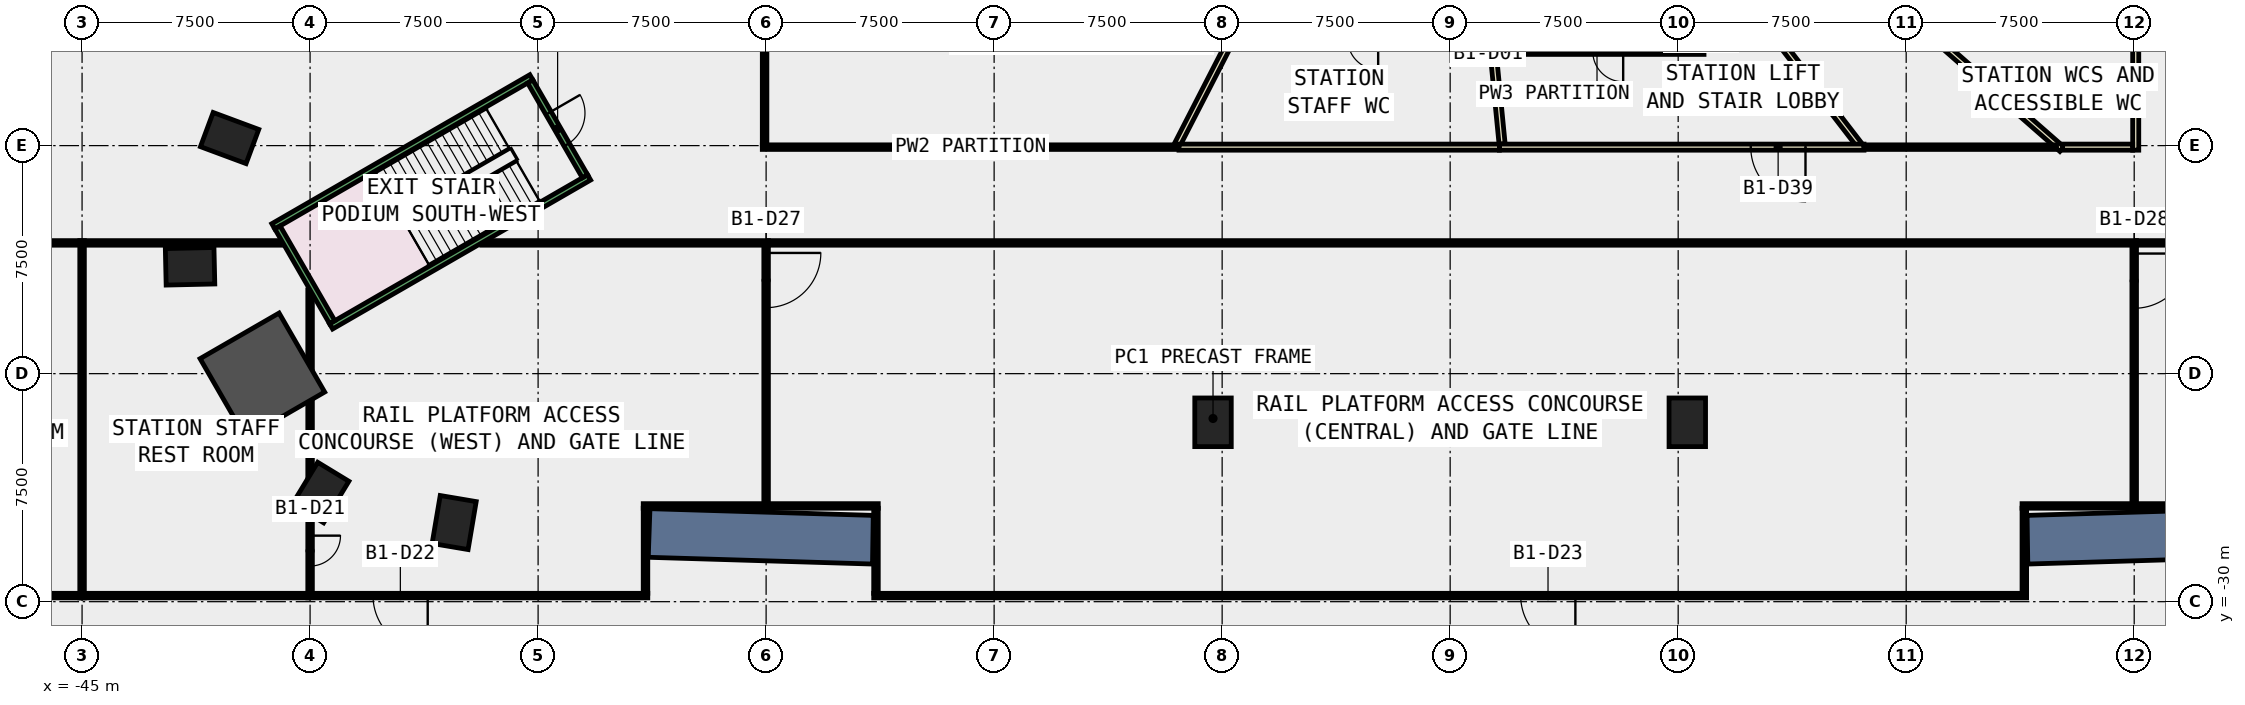
"""IFC4 building model, lengths in metres.
Left out: names, types, materials, properties, quantities, classifications, styles, units other than length and angle.
Written with IfcOpenShell. Run it as: python <this file> out.ifc"""

import sys

from ifc_helpers import new_model, si_unit, direction, frame, frame_2d, origin, origin_2d, place, context, subcontext, project, spatial, polyline, rectangle, outline, extrude, element, fill, save


model = new_model("IFC4")
c1 = context("Model", 3, precision=1e-05, world=origin(), true_north=direction((0.0, 1.0)))
c2 = subcontext(c1, "Body", "Model", "MODEL_VIEW")
j1 = project(units=[si_unit("LENGTHUNIT", "METRE"), si_unit("PLANEANGLEUNIT", "RADIAN")], contexts=[c1])
p1 = place(None, origin())
s1 = spatial("IfcSite", under=j1, at=p1, CompositionType="ELEMENT")
p2 = place(p1, origin())
s2 = spatial("IfcBuilding", under=s1, at=p2, CompositionType="ELEMENT")
p3 = place(p2, frame((0.0, 0.0, -5.5)))
s3 = spatial("IfcBuildingStorey", under=s2, at=p3, CompositionType="ELEMENT", Elevation=-5.5)
for number, where, z_axis, x_axis in (
    (1, (-32.761, -27.397, -0.42), (0.0, 0.0, 1.0), (-0.986, 0.167, 0.0)),
    (2, (-40.147, -14.751, -0.42), (0.0, 0.0, 1.0), (0.348, 0.937, 0.0)),
    (3, (-41.448, -18.969, -0.42), (0.0, 0.0, 1.0), (-0.023, 1.0, 0.0)),
):
    element("IfcColumn", number, at=place(p3, frame(where, z_axis=z_axis, x_axis=x_axis)), inside=s3, PredefinedType="COLUMN", context=c2, shape_type="SweptSolid", body=[
        extrude(rectangle(XDim=1.2, YDim=1.6, at=origin_2d()), origin(), (0.0, 0.0, 1.0), 5.42),
    ])
p4 = place(p3, frame((-39.069, -22.556, -0.42), z_axis=(0.0, 0.0, 1.0), x_axis=(0.866025403784, 0.5, 0.0)))
e4 = element("IfcColumn", 4, at=p4, inside=s3, PredefinedType="COLUMN", context=c2, shape_type="SweptSolid", body=[
    extrude(rectangle(XDim=3.0, YDim=3.0, at=origin_2d()), origin(), (0.0, 0.0, 1.0), 5.42),
])
for number, where, z_axis, x_axis in (
    (5, (-37.152, -26.411, -0.42), (0.0, 0.0, 1.0), (-0.855, 0.519, 0.0)),
    (6, (-7.8, -24.1, -0.42), (0.0, 0.0, 1.0), (1.0, 0.0, 0.0)),
    (7, (7.8, -24.1, -0.42), (0.0, 0.0, 1.0), (1.0, 0.0, 0.0)),
):
    element("IfcColumn", number, at=place(p3, frame(where, z_axis=z_axis, x_axis=x_axis)), inside=s3, PredefinedType="COLUMN", context=c2, shape_type="SweptSolid", body=[
        extrude(rectangle(XDim=1.2, YDim=1.6, at=origin_2d()), origin(), (0.0, 0.0, 1.0), 5.42),
    ])
p5 = place(p3, frame((0.0, 0.0, -0.42)))
e8 = element("IfcWall", 8, at=p5, inside=s3, PredefinedType="SHEAR", context=c2, shape_type="SweptSolid", body=[
    extrude(outline(polyline([(19.0, -28.762), (26.377, -28.54), (26.321, -26.941), (18.976, -27.162), (19.0, -28.762)])), origin(), (0.0, 0.0, 1.0), 5.42),
])
p6 = place(p3, frame((0.0, 0.0, -0.42)))
e9 = element("IfcWall", 9, at=p6, inside=s3, PredefinedType="SHEAR", context=c2, shape_type="SweptSolid", body=[
    extrude(outline(polyline([(-26.377, -28.54), (-19.0, -28.762), (-18.976, -27.162), (-26.321, -26.941), (-26.377, -28.54)])), origin(), (0.0, 0.0, 1.0), 5.42),
])
p7 = place(p3, frame((8.35, -11.9, 0.0), z_axis=(0.0, 0.0, 1.0), x_axis=(-1.0, 0.0, 0.0)))
e10 = element("IfcWall", 10, at=p7, inside=s3, PredefinedType="PARTITIONING", context=c2, shape_type="SweptSolid", body=[
    extrude(rectangle(XDim=7.039, YDim=0.2, at=frame_2d((3.52, 0.0))), origin(), (0.0, 0.0, 1.0), 4.9),
])
p8 = place(p7, frame((2.659, 0.0, 0.0)))
e11 = element("IfcOpeningElement", 11, at=p8, cuts=e10, PredefinedType="OPENING", context=c2, shape_type="SweptSolid", body=[
    extrude(rectangle(XDim=1.0, YDim=2.1, at=frame_2d((0.5, 1.05))), frame((0.0, 0.11, 0.0), z_axis=(0.0, -1.0, 0.0), x_axis=(1.0, 0.0, 0.0)), (0.0, 0.0, 1.0), 0.22),
])
p9 = place(p3, frame((1.25, -12.0, 0.0), z_axis=(0.0, 0.0, 1.0), x_axis=(0.0, 1.0, 0.0)))
e12 = element("IfcWall", 12, at=p9, inside=s3, PredefinedType="PARTITIONING", context=c2, shape_type="SweptSolid", body=[
    extrude(rectangle(XDim=0.4, YDim=0.2, at=frame_2d((0.2, 0.0))), origin(), (0.0, 0.0, 1.0), 4.9),
])
p10 = place(p3, frame((1.709, -14.95, 0.0), z_axis=(0.0, 0.0, 1.0), x_axis=(-0.097271264249, 0.995257906852, 0.0)))
e13 = element("IfcWall", 13, at=p10, inside=s3, PredefinedType="PARTITIONING", context=c2, shape_type="SweptSolid", body=[
    extrude(rectangle(XDim=3.065, YDim=0.2, at=frame_2d((1.532, 0.0))), origin(), (0.0, 0.0, 1.0), 4.9),
])
p11 = place(p3, frame((9.177, -9.419, 0.0), z_axis=(0.0, 0.0, 1.0), x_axis=(0.610138829962, -0.792294521104, 0.0)))
e14 = element("IfcWall", 14, at=p11, inside=s3, PredefinedType="PARTITIONING", context=c2, shape_type="SweptSolid", body=[
    extrude(rectangle(XDim=7.082, YDim=0.2, at=frame_2d((3.541, 0.0))), origin(), (0.0, 0.0, 1.0), 4.9),
])
p12 = place(p3, frame((13.613, -15.05, 0.0), z_axis=(0.0, 0.0, 1.0), x_axis=(-1.0, 0.0, 0.0)))
e15 = element("IfcWall", 15, at=p12, inside=s3, PredefinedType="PARTITIONING", context=c2, shape_type="SweptSolid", body=[
    extrude(rectangle(XDim=11.994, YDim=0.2, at=frame_2d((5.997, 0.0))), origin(), (0.0, 0.0, 1.0), 4.9),
])
p13 = place(p12, frame((1.925, 0.0, 0.0)))
e16 = element("IfcOpeningElement", 16, at=p13, cuts=e15, PredefinedType="OPENING", context=c2, shape_type="SweptSolid", body=[
    extrude(rectangle(XDim=1.8, YDim=2.1, at=frame_2d((0.9, 1.05))), frame((0.0, 0.11, 0.0), z_axis=(0.0, -1.0, 0.0), x_axis=(1.0, 0.0, 0.0)), (0.0, 0.0, 1.0), 0.22),
])
p14 = place(p3, frame((-7.196, -11.5, 0.0), z_axis=(0.0, 0.0, 1.0), x_axis=(-0.456975104855, -0.889479484611, 0.0)))
e17 = element("IfcWall", 17, at=p14, inside=s3, PredefinedType="PARTITIONING", context=c2, shape_type="SweptSolid", body=[
    extrude(rectangle(XDim=3.891, YDim=0.2, at=frame_2d((1.945, 0.0))), origin(), (0.0, 0.0, 1.0), 4.9),
])
p15 = place(p3, frame((-8.92, -15.05, 0.0), z_axis=(0.0, 0.0, 1.0), x_axis=(-1.0, 0.0, 0.0)))
e18 = element("IfcWall", 18, at=p15, inside=s3, PredefinedType="PARTITIONING", context=c2, shape_type="SweptSolid", body=[
    extrude(rectangle(XDim=13.705, YDim=0.15, at=frame_2d((6.853, 0.0))), origin(), (0.0, 0.0, 1.0), 4.9),
])
p16 = place(p3, frame((-22.55, -14.975, 0.0), z_axis=(0.0, 0.0, 1.0), x_axis=(0.0, 1.0, 0.0)))
e19 = element("IfcWall", 19, at=p16, inside=s3, PredefinedType="PARTITIONING", context=c2, shape_type="SweptSolid", body=[
    extrude(rectangle(XDim=4.381, YDim=0.15, at=frame_2d((2.19, 0.0))), origin(), (0.0, 0.0, 1.0), 4.9),
])
p17 = place(p3, frame((1.619, -15.05, 0.0), z_axis=(0.0, 0.0, 1.0), x_axis=(-1.0, 0.0, 0.0)))
e20 = element("IfcWall", 20, at=p17, inside=s3, PredefinedType="PARTITIONING", context=c2, shape_type="SweptSolid", body=[
    extrude(rectangle(XDim=10.539, YDim=0.2, at=frame_2d((5.27, 0.0))), origin(), (0.0, 0.0, 1.0), 4.9),
])
p18 = place(p3, frame((10.663, -6.835, 0.0), z_axis=(0.0, 0.0, 1.0), x_axis=(0.752369729321, -0.658741064761, 0.0)))
e21 = element("IfcWall", 21, at=p18, inside=s3, PredefinedType="PARTITIONING", context=c2, shape_type="SweptSolid", body=[
    extrude(rectangle(XDim=12.571, YDim=0.2, at=frame_2d((6.286, 0.0))), origin(), (0.0, 0.0, 1.0), 4.9),
])
p19 = place(p3, frame((19.946, -15.05, 0.0), z_axis=(0.0, 0.0, 1.0), x_axis=(-1.0, 0.0, 0.0)))
e22 = element("IfcWall", 22, at=p19, inside=s3, PredefinedType="PARTITIONING", context=c2, shape_type="SweptSolid", body=[
    extrude(rectangle(XDim=6.333, YDim=0.15, at=frame_2d((3.167, 0.0))), origin(), (0.0, 0.0, 1.0), 4.9),
])
p20 = place(p3, frame((22.55, -10.619, 0.0), z_axis=(0.0, 0.0, 1.0), x_axis=(0.0, -1.0, 0.0)))
e23 = element("IfcWall", 23, at=p20, inside=s3, PredefinedType="PARTITIONING", context=c2, shape_type="SweptSolid", body=[
    extrude(rectangle(XDim=4.531, YDim=0.2, at=frame_2d((2.266, 0.0))), origin(), (0.0, 0.0, 1.0), 4.9),
])
p21 = place(p3, frame((22.45, -15.05, 0.0), z_axis=(0.0, 0.0, 1.0), x_axis=(-1.0, 0.0, 0.0)))
e24 = element("IfcWall", 24, at=p21, inside=s3, PredefinedType="PARTITIONING", context=c2, shape_type="SweptSolid", body=[
    extrude(rectangle(XDim=2.304, YDim=0.2, at=frame_2d((1.152, 0.0))), origin(), (0.0, 0.0, 1.0), 4.9),
])
for number, where, z_axis, x_axis in (
    (25, (-52.425, -18.2, 0.0), (0.0, 0.0, 1.0), (1.0, 0.0, 0.0)),
    (26, (-45.075, -29.8, 0.0), (0.0, 0.0, 1.0), (-1.0, 0.0, 0.0)),
):
    element("IfcWall", number, at=place(p3, frame(where, z_axis=z_axis, x_axis=x_axis)), inside=s3, PredefinedType="PARTITIONING", context=c2, shape_type="SweptSolid", body=[
        extrude(rectangle(XDim=7.35, YDim=0.15, at=frame_2d((3.675, 0.0))), origin(), (0.0, 0.0, 1.0), 4.9),
    ])
p22 = place(p3, frame((-44.925, -18.2, 0.0), z_axis=(0.0, 0.0, 1.0), x_axis=(1.0, 0.0, 0.0)))
e27 = element("IfcWall", 27, at=p22, inside=s3, PredefinedType="PARTITIONING", context=c2, shape_type="SweptSolid", body=[
    extrude(rectangle(XDim=6.531, YDim=0.15, at=frame_2d((3.266, 0.0))), origin(), (0.0, 0.0, 1.0), 4.9),
])
p23 = place(p3, frame((-37.575, -29.8, 0.0), z_axis=(0.0, 0.0, 1.0), x_axis=(-1.0, 0.0, 0.0)))
e28 = element("IfcWall", 28, at=p23, inside=s3, PredefinedType="PARTITIONING", context=c2, shape_type="SweptSolid", body=[
    extrude(rectangle(XDim=7.35, YDim=0.15, at=frame_2d((3.675, 0.0))), origin(), (0.0, 0.0, 1.0), 4.9),
])
p24 = place(p3, frame((-31.853, -18.2, 0.0), z_axis=(0.0, 0.0, 1.0), x_axis=(1.0, 0.0, 0.0)))
e29 = element("IfcWall", 29, at=p24, inside=s3, PredefinedType="PARTITIONING", context=c2, shape_type="SweptSolid", body=[
    extrude(rectangle(XDim=9.428, YDim=0.15, at=frame_2d((4.714, 0.0))), origin(), (0.0, 0.0, 1.0), 4.9),
])
p25 = place(p3, frame((-22.575, -26.851, 0.0), z_axis=(0.0, 0.0, 1.0), x_axis=(-1.0, 0.0, 0.0)))
e30 = element("IfcWall", 30, at=p25, inside=s3, PredefinedType="PARTITIONING", context=c2, shape_type="SweptSolid", body=[
    extrude(rectangle(XDim=3.967, YDim=0.15, at=frame_2d((1.983, 0.0))), origin(), (0.0, 0.0, 1.0), 4.9),
])
p26 = place(p3, frame((-26.467, -26.926, 0.0), z_axis=(0.0, 0.0, 1.0), x_axis=(0.0, -1.0, 0.0)))
e31 = element("IfcWall", 31, at=p26, inside=s3, PredefinedType="PARTITIONING", context=c2, shape_type="SweptSolid", body=[
    extrude(rectangle(XDim=2.799, YDim=0.15, at=frame_2d((1.399, 0.0))), origin(), (0.0, 0.0, 1.0), 4.9),
])
p27 = place(p3, frame((-26.392, -29.8, 0.0), z_axis=(0.0, 0.0, 1.0), x_axis=(-1.0, 0.0, 0.0)))
e32 = element("IfcWall", 32, at=p27, inside=s3, PredefinedType="PARTITIONING", context=c2, shape_type="SweptSolid", body=[
    extrude(rectangle(XDim=11.183, YDim=0.15, at=frame_2d((5.591, 0.0))), origin(), (0.0, 0.0, 1.0), 4.9),
])
p28 = place(p27, frame((7.239, 0.0, 0.0)))
e33 = element("IfcOpeningElement", 33, at=p28, cuts=e32, PredefinedType="OPENING", context=c2, shape_type="SweptSolid", body=[
    extrude(rectangle(XDim=1.8, YDim=2.1, at=frame_2d((0.9, 1.05))), frame((0.0, 0.085, 0.0), z_axis=(0.0, -1.0, 0.0), x_axis=(1.0, 0.0, 0.0)), (0.0, 0.0, 1.0), 0.17),
])
p29 = place(p3, frame((22.425, -26.851, 0.0), z_axis=(0.0, 0.0, 1.0), x_axis=(-1.0, 0.0, 0.0)))
e34 = element("IfcWall", 34, at=p29, inside=s3, PredefinedType="PARTITIONING", context=c2, shape_type="SweptSolid", body=[
    extrude(rectangle(XDim=3.614, YDim=0.15, at=frame_2d((1.807, 0.0))), origin(), (0.0, 0.0, 1.0), 4.9),
])
p30 = place(p3, frame((18.886, -26.926, 0.0), z_axis=(0.0, 0.0, 1.0), x_axis=(0.0, -1.0, 0.0)))
e35 = element("IfcWall", 35, at=p30, inside=s3, PredefinedType="PARTITIONING", context=c2, shape_type="SweptSolid", body=[
    extrude(rectangle(XDim=2.799, YDim=0.15, at=frame_2d((1.399, 0.0))), origin(), (0.0, 0.0, 1.0), 4.9),
])
p31 = place(p3, frame((18.961, -29.8, 0.0), z_axis=(0.0, 0.0, 1.0), x_axis=(-1.0, 0.0, 0.0)))
e36 = element("IfcWall", 36, at=p31, inside=s3, PredefinedType="PARTITIONING", context=c2, shape_type="SweptSolid", body=[
    extrude(rectangle(XDim=37.922, YDim=0.15, at=frame_2d((18.961, 0.0))), origin(), (0.0, 0.0, 1.0), 4.9),
])
p32 = place(p31, frame((14.842, 0.0, 0.0)))
e37 = element("IfcOpeningElement", 37, at=p32, cuts=e36, PredefinedType="OPENING", context=c2, shape_type="SweptSolid", body=[
    extrude(rectangle(XDim=1.8, YDim=2.1, at=frame_2d((0.9, 1.05))), frame((0.0, 0.085, 0.0), z_axis=(0.0, -1.0, 0.0), x_axis=(1.0, 0.0, 0.0)), (0.0, 0.0, 1.0), 0.17),
])
p33 = place(p3, frame((-18.886, -29.725, 0.0), z_axis=(0.0, 0.0, 1.0), x_axis=(0.0, 1.0, 0.0)))
e38 = element("IfcWall", 38, at=p33, inside=s3, PredefinedType="PARTITIONING", context=c2, shape_type="SweptSolid", body=[
    extrude(rectangle(XDim=2.799, YDim=0.15, at=frame_2d((1.399, 0.0))), origin(), (0.0, 0.0, 1.0), 4.9),
])
p34 = place(p3, frame((-18.811, -26.851, 0.0), z_axis=(0.0, 0.0, 1.0), x_axis=(-1.0, 0.0, 0.0)))
e39 = element("IfcWall", 39, at=p34, inside=s3, PredefinedType="PARTITIONING", context=c2, shape_type="SweptSolid", body=[
    extrude(rectangle(XDim=3.614, YDim=0.15, at=frame_2d((1.807, 0.0))), origin(), (0.0, 0.0, 1.0), 4.9),
])
p35 = place(p3, frame((-22.425, -18.2, 0.0), z_axis=(0.0, 0.0, 1.0), x_axis=(1.0, 0.0, 0.0)))
e40 = element("IfcWall", 40, at=p35, inside=s3, PredefinedType="PARTITIONING", context=c2, shape_type="SweptSolid", body=[
    extrude(rectangle(XDim=45.0, YDim=0.15, at=frame_2d((22.5, 0.0))), origin(), (0.0, 0.0, 1.0), 4.9),
])
p36 = place(p3, frame((26.542, -26.851, 0.0), z_axis=(0.0, 0.0, 1.0), x_axis=(-1.0, 0.0, 0.0)))
e41 = element("IfcWall", 41, at=p36, inside=s3, PredefinedType="PARTITIONING", context=c2, shape_type="SweptSolid", body=[
    extrude(rectangle(XDim=3.967, YDim=0.15, at=frame_2d((1.983, 0.0))), origin(), (0.0, 0.0, 1.0), 4.9),
])
p37 = place(p3, frame((22.575, -18.2, 0.0), z_axis=(0.0, 0.0, 1.0), x_axis=(1.0, 0.0, 0.0)))
e42 = element("IfcWall", 42, at=p37, inside=s3, PredefinedType="PARTITIONING", context=c2, shape_type="SweptSolid", body=[
    extrude(rectangle(XDim=9.278, YDim=0.15, at=frame_2d((4.639, 0.0))), origin(), (0.0, 0.0, 1.0), 4.9),
])
p38 = place(p3, frame((-45.0, -18.125, 0.0), z_axis=(0.0, 0.0, 1.0), x_axis=(0.0, -1.0, 0.0)))
e43 = element("IfcWall", 43, at=p38, inside=s3, PredefinedType="PARTITIONING", context=c2, shape_type="SweptSolid", body=[
    extrude(rectangle(XDim=11.75, YDim=0.15, at=frame_2d((5.875, 0.0))), origin(), (0.0, 0.0, 1.0), 4.9),
])
p39 = place(p3, frame((-37.5, -19.748, 0.0), z_axis=(0.0, 0.0, 1.0), x_axis=(0.0, -1.0, 0.0)))
e44 = element("IfcWall", 44, at=p39, inside=s3, PredefinedType="PARTITIONING", context=c2, shape_type="SweptSolid", body=[
    extrude(rectangle(XDim=10.052, YDim=0.15, at=frame_2d((5.026, 0.0))), origin(), (0.0, 0.0, 1.0), 4.9),
])
p40 = place(p39, frame((8.08, 0.0, 0.0)))
e45 = element("IfcOpeningElement", 45, at=p40, cuts=e44, PredefinedType="OPENING", context=c2, shape_type="SweptSolid", body=[
    extrude(rectangle(XDim=1.0, YDim=2.1, at=frame_2d((0.5, 1.05))), frame((0.0, 0.085, 0.0), z_axis=(0.0, -1.0, 0.0), x_axis=(1.0, 0.0, 0.0)), (0.0, 0.0, 1.0), 0.17),
])
p41 = place(p3, frame((-22.5, -18.275, 0.0), z_axis=(0.0, 0.0, 1.0), x_axis=(0.0, -1.0, 0.0)))
e46 = element("IfcWall", 46, at=p41, inside=s3, PredefinedType="PARTITIONING", context=c2, shape_type="SweptSolid", body=[
    extrude(rectangle(XDim=8.651, YDim=0.15, at=frame_2d((4.326, 0.0))), origin(), (0.0, 0.0, 1.0), 4.9),
])
p42 = place(p41, frame((0.255, 0.0, 0.0)))
e47 = element("IfcOpeningElement", 47, at=p42, cuts=e46, PredefinedType="OPENING", context=c2, shape_type="SweptSolid", body=[
    extrude(rectangle(XDim=1.8, YDim=2.1, at=frame_2d((0.9, 1.05))), frame((0.0, 0.085, 0.0), z_axis=(0.0, -1.0, 0.0), x_axis=(1.0, 0.0, 0.0)), (0.0, 0.0, 1.0), 0.17),
])
p43 = place(p3, frame((22.5, -18.275, 0.0), z_axis=(0.0, 0.0, 1.0), x_axis=(0.0, -1.0, 0.0)))
e48 = element("IfcWall", 48, at=p43, inside=s3, PredefinedType="PARTITIONING", context=c2, shape_type="SweptSolid", body=[
    extrude(rectangle(XDim=8.651, YDim=0.15, at=frame_2d((4.326, 0.0))), origin(), (0.0, 0.0, 1.0), 4.9),
])
p44 = place(p43, frame((0.275, 0.0, 0.0)))
e49 = element("IfcOpeningElement", 49, at=p44, cuts=e48, PredefinedType="OPENING", context=c2, shape_type="SweptSolid", body=[
    extrude(rectangle(XDim=1.8, YDim=2.1, at=frame_2d((0.9, 1.05))), frame((0.0, 0.085, 0.0), z_axis=(0.0, -1.0, 0.0), x_axis=(1.0, 0.0, 0.0)), (0.0, 0.0, 1.0), 0.17),
])
for number, where, z_axis, x_axis in (
    (50, (-30.222, -12.755, 0.0), (0.0, 0.0, 1.0), (-0.866, -0.5, 0.0)),
    (51, (-28.322, -16.045, 0.0), (0.0, 0.0, 1.0), (-0.866, -0.5, 0.0)),
):
    element("IfcWall", number, at=place(p3, frame(where, z_axis=z_axis, x_axis=x_axis)), inside=s3, PredefinedType="STANDARD", context=c2, shape_type="SweptSolid", body=[
        extrude(rectangle(XDim=9.8, YDim=0.2, at=frame_2d((4.9, 0.0))), origin(), (0.0, 0.0, 1.0), 4.9),
    ])
p45 = place(p3, frame((-30.258, -12.891, 0.0), z_axis=(0.0, 0.0, 1.0), x_axis=(0.499982693035, -0.866035395735, 0.0)))
e52 = element("IfcWall", 52, at=p45, inside=s3, PredefinedType="STANDARD", context=c2, shape_type="SweptSolid", body=[
    extrude(rectangle(XDim=3.6, YDim=0.2, at=frame_2d((1.8, 0.0))), origin(), (0.0, 0.0, 1.0), 4.9),
])
p46 = place(p45, frame((1.2, 0.0, 0.0)))
e53 = element("IfcOpeningElement", 53, at=p46, cuts=e52, PredefinedType="OPENING", context=c2, shape_type="SweptSolid", body=[
    extrude(rectangle(XDim=1.2, YDim=2.2, at=frame_2d((0.6, 1.1))), frame((0.0, 0.11, 0.0), z_axis=(0.0, -1.0, 0.0), x_axis=(1.0, 0.0, 0.0)), (0.0, 0.0, 1.0), 0.22),
])
p47 = place(p3, frame((-38.572, -17.691, 0.0), z_axis=(0.0, 0.0, 1.0), x_axis=(0.49995333141, -0.866052346231, 0.0)))
e54 = element("IfcWall", 54, at=p47, inside=s3, PredefinedType="STANDARD", context=c2, shape_type="SweptSolid", body=[
    extrude(rectangle(XDim=3.6, YDim=0.2, at=frame_2d((1.8, 0.0))), origin(), (0.0, 0.0, 1.0), 4.9),
])
p48 = place(p40, origin())
e55 = element("IfcDoor", 55, at=p48, inside=s3, OperationType="SINGLE_SWING_LEFT", PredefinedType="DOOR", context=c2, shape_type="SweptSolid", body=[
    extrude(rectangle(XDim=1.0, YDim=2.1, at=frame_2d((0.5, 1.05))), frame((0.0, 0.025, 0.0), z_axis=(0.0, -1.0, 0.0), x_axis=(1.0, 0.0, 0.0)), (0.0, 0.0, 1.0), 0.05),
])
fill(e45, e55)
p49 = place(p28, origin())
e56 = element("IfcDoor", 56, at=p49, inside=s3, OperationType="DOUBLE_DOOR_SINGLE_SWING", PredefinedType="DOOR", context=c2, shape_type="SweptSolid", body=[
    extrude(rectangle(XDim=1.8, YDim=2.1, at=frame_2d((0.9, 1.05))), frame((0.0, 0.025, 0.0), z_axis=(0.0, -1.0, 0.0), x_axis=(1.0, 0.0, 0.0)), (0.0, 0.0, 1.0), 0.05),
])
fill(e33, e56)
p50 = place(p32, origin())
e57 = element("IfcDoor", 57, at=p50, inside=s3, OperationType="DOUBLE_DOOR_SINGLE_SWING", PredefinedType="DOOR", context=c2, shape_type="SweptSolid", body=[
    extrude(rectangle(XDim=1.8, YDim=2.1, at=frame_2d((0.9, 1.05))), frame((0.0, 0.025, 0.0), z_axis=(0.0, -1.0, 0.0), x_axis=(1.0, 0.0, 0.0)), (0.0, 0.0, 1.0), 0.05),
])
fill(e37, e57)
p51 = place(p42, origin())
e58 = element("IfcDoor", 58, at=p51, inside=s3, OperationType="DOUBLE_DOOR_SINGLE_SWING", PredefinedType="DOOR", context=c2, shape_type="SweptSolid", body=[
    extrude(rectangle(XDim=1.8, YDim=2.1, at=frame_2d((0.9, 1.05))), frame((0.0, 0.025, 0.0), z_axis=(0.0, -1.0, 0.0), x_axis=(1.0, 0.0, 0.0)), (0.0, 0.0, 1.0), 0.05),
])
fill(e47, e58)
p52 = place(p44, origin())
e59 = element("IfcDoor", 59, at=p52, inside=s3, OperationType="DOUBLE_DOOR_SINGLE_SWING", PredefinedType="DOOR", context=c2, shape_type="SweptSolid", body=[
    extrude(rectangle(XDim=1.8, YDim=2.1, at=frame_2d((0.9, 1.05))), frame((0.0, 0.025, 0.0), z_axis=(0.0, -1.0, 0.0), x_axis=(1.0, 0.0, 0.0)), (0.0, 0.0, 1.0), 0.05),
])
fill(e49, e59)
p53 = place(p13, origin())
e60 = element("IfcDoor", 60, at=p53, inside=s3, OperationType="DOUBLE_DOOR_SINGLE_SWING", PredefinedType="DOOR", context=c2, shape_type="SweptSolid", body=[
    extrude(rectangle(XDim=1.8, YDim=2.1, at=frame_2d((0.9, 1.05))), frame((0.0, 0.025, 0.0), z_axis=(0.0, -1.0, 0.0), x_axis=(1.0, 0.0, 0.0)), (0.0, 0.0, 1.0), 0.05),
])
fill(e16, e60)
p54 = place(p46, origin())
e61 = element("IfcDoor", 61, at=p54, inside=s3, OperationType="SINGLE_SWING_LEFT", PredefinedType="DOOR", context=c2, shape_type="SweptSolid", body=[
    extrude(rectangle(XDim=1.2, YDim=2.2, at=frame_2d((0.6, 1.1))), frame((0.0, 0.025, 0.0), z_axis=(0.0, -1.0, 0.0), x_axis=(1.0, 0.0, 0.0)), (0.0, 0.0, 1.0), 0.05),
])
fill(e53, e61)
save(model, sys.argv[1])
